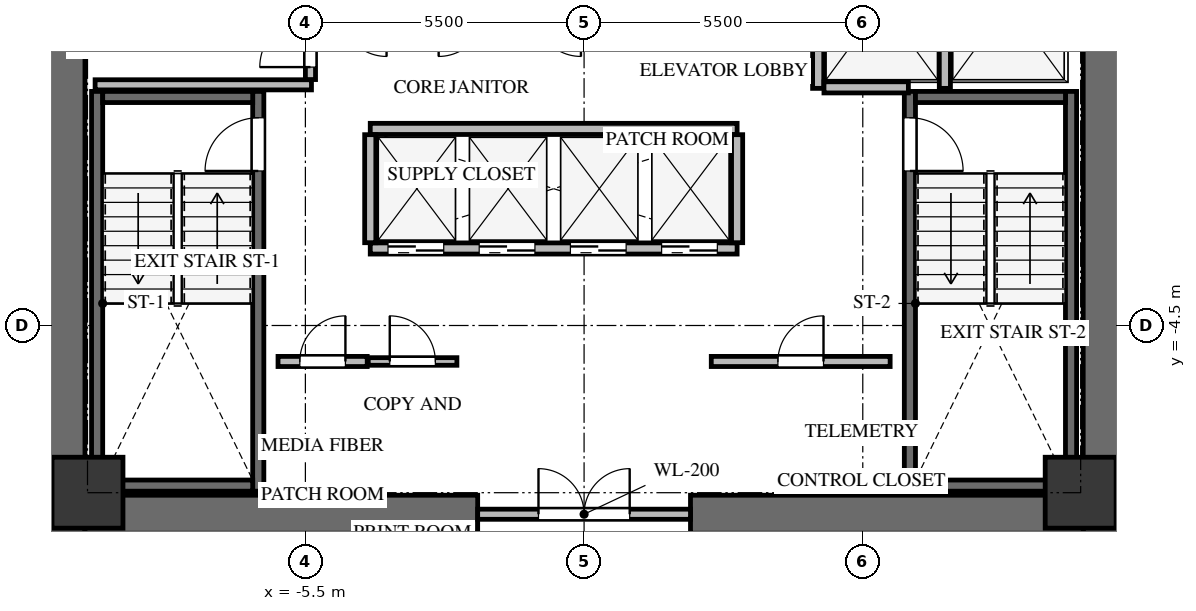
"""IFC4 building model, lengths in metres.
Left out: names, types, materials, properties, quantities, classifications, styles, units other than length and angle.
Written with IfcOpenShell. Run it as: python <this file> out.ifc"""

import sys

from ifc_helpers import new_model, si_unit, direction, frame, frame_2d, origin, origin_2d, place, context, subcontext, project, spatial, rectangle, extrude, source, transform, mapped, element, fill, save


model = new_model("IFC4")
c1 = context("Model", 3, precision=1e-05, world=origin(), true_north=direction((0.0, 1.0)))
c2 = subcontext(c1, "Body", "Model", "MODEL_VIEW")
j1 = project(units=[si_unit("LENGTHUNIT", "METRE"), si_unit("PLANEANGLEUNIT", "RADIAN")], contexts=[c1])
p1 = place(None, origin())
s1 = spatial("IfcSite", under=j1, at=p1, CompositionType="ELEMENT")
p2 = place(p1, origin())
s2 = spatial("IfcBuilding", under=s1, at=p2, CompositionType="ELEMENT")
p3 = place(p2, frame((0.0, 0.0, 107.4)))
s3 = spatial("IfcBuildingStorey", under=s2, at=p3, CompositionType="ELEMENT", Elevation=107.4)
for number, where, z_axis, x_axis in (
    (1, (-10.225, -8.6, 0.0), (0.0, 0.0, 1.0), (0.0, 1.0, 0.0)),
    (2, (10.225, -8.6, 0.0), (0.0, 0.0, 1.0), (0.0, 1.0, 0.0)),
):
    element("IfcWall", number, at=place(p3, frame(where, z_axis=z_axis, x_axis=x_axis)), inside=s3, PredefinedType="SHEAR", context=c2, shape_type="SweptSolid", body=[
        extrude(rectangle(XDim=17.2, YDim=0.75, at=frame_2d((8.6, 0.0))), origin(), (0.0, 0.0, 1.0), 3.3),
    ])
for number, where, z_axis, x_axis in (
    (3, (-9.85, -8.225, 0.0), (0.0, 0.0, 1.0), (1.0, 0.0, 0.0)),
    (4, (2.1, -8.225, 0.0), (0.0, 0.0, 1.0), (1.0, 0.0, 0.0)),
):
    element("IfcWall", number, at=place(p3, frame(where, z_axis=z_axis, x_axis=x_axis)), inside=s3, PredefinedType="SHEAR", context=c2, shape_type="SweptSolid", body=[
        extrude(rectangle(XDim=7.75, YDim=0.75, at=frame_2d((3.875, 0.0))), origin(), (0.0, 0.0, 1.0), 3.3),
    ])
p4 = place(p3, frame((-6.43, -7.77, -0.24), z_axis=(0.0, 0.0, 1.0), x_axis=(0.0, 1.0, 0.0)))
e5 = element("IfcWall", 5, at=p4, inside=s3, PredefinedType="SHEAR", context=c2, shape_type="SweptSolid", body=[
    extrude(rectangle(XDim=7.89, YDim=0.22, at=frame_2d((3.945, 0.0))), origin(), (0.0, 0.0, 1.0), 3.3),
])
p5 = place(p4, frame((6.32, 0.0, 0.0)))
e6 = element("IfcOpeningElement", 6, at=p5, cuts=e5, PredefinedType="OPENING", context=c2, shape_type="SweptSolid", body=[
    extrude(rectangle(XDim=1.05, YDim=2.15, at=frame_2d((0.525, 1.075))), frame((0.0, 0.12, 0.0), z_axis=(0.0, -1.0, 0.0), x_axis=(1.0, 0.0, 0.0)), (0.0, 0.0, 1.0), 0.24),
])
p6 = place(p3, frame((-9.61, 0.12, -0.24), z_axis=(0.0, 0.0, 1.0), x_axis=(0.0, -1.0, 0.0)))
e7 = element("IfcWall", 7, at=p6, inside=s3, PredefinedType="SHEAR", context=c2, shape_type="SweptSolid", body=[
    extrude(rectangle(XDim=7.89, YDim=0.22, at=frame_2d((3.945, 0.0))), origin(), (0.0, 0.0, 1.0), 3.3),
])
for number, where, z_axis, x_axis in (
    (8, (-9.5, -7.66, -0.24), (0.0, 0.0, 1.0), (1.0, 0.0, 0.0)),
    (9, (-6.54, 0.01, -0.24), (0.0, 0.0, 1.0), (-1.0, 0.0, 0.0)),
):
    element("IfcWall", number, at=place(p3, frame(where, z_axis=z_axis, x_axis=x_axis)), inside=s3, PredefinedType="SHEAR", context=c2, shape_type="SweptSolid", body=[
        extrude(rectangle(XDim=2.96, YDim=0.22, at=frame_2d((1.48, 0.0))), origin(), (0.0, 0.0, 1.0), 3.3),
    ])
p7 = place(p3, frame((9.61, -7.77, -0.24), z_axis=(0.0, 0.0, 1.0), x_axis=(0.0, 1.0, 0.0)))
e10 = element("IfcWall", 10, at=p7, inside=s3, PredefinedType="SHEAR", context=c2, shape_type="SweptSolid", body=[
    extrude(rectangle(XDim=7.89, YDim=0.22, at=frame_2d((3.945, 0.0))), origin(), (0.0, 0.0, 1.0), 3.3),
])
p8 = place(p3, frame((6.43, 0.12, -0.24), z_axis=(0.0, 0.0, 1.0), x_axis=(0.0, -1.0, 0.0)))
e11 = element("IfcWall", 11, at=p8, inside=s3, PredefinedType="SHEAR", context=c2, shape_type="SweptSolid", body=[
    extrude(rectangle(XDim=7.89, YDim=0.22, at=frame_2d((3.945, 0.0))), origin(), (0.0, 0.0, 1.0), 3.3),
])
p9 = place(p8, frame((0.52, 0.0, 0.0)))
e12 = element("IfcOpeningElement", 12, at=p9, cuts=e11, PredefinedType="OPENING", context=c2, shape_type="SweptSolid", body=[
    extrude(rectangle(XDim=1.05, YDim=2.15, at=frame_2d((0.525, 1.075))), frame((0.0, 0.12, 0.0), z_axis=(0.0, -1.0, 0.0), x_axis=(1.0, 0.0, 0.0)), (0.0, 0.0, 1.0), 0.24),
])
for number, where, z_axis, x_axis in (
    (13, (6.54, -7.66, -0.24), (0.0, 0.0, 1.0), (1.0, 0.0, 0.0)),
    (14, (9.5, 0.01, -0.24), (0.0, 0.0, 1.0), (-1.0, 0.0, 0.0)),
):
    element("IfcWall", number, at=place(p3, frame(where, z_axis=z_axis, x_axis=x_axis)), inside=s3, PredefinedType="SHEAR", context=c2, shape_type="SweptSolid", body=[
        extrude(rectangle(XDim=2.96, YDim=0.22, at=frame_2d((1.48, 0.0))), origin(), (0.0, 0.0, 1.0), 3.3),
    ])
m1 = source(origin(), c2, "Body", "SweptSolid", [
    extrude(rectangle(XDim=1.4, YDim=1.4, at=origin_2d()), origin(), (0.0, 0.0, 1.0), 3.3),
])
for number, where, z_axis, x_axis in (
    (15, (-9.8, -7.8, -0.24), (0.0, 0.0, 1.0), (1.0, 0.0, 0.0)),
    (16, (9.8, -7.8, -0.24), (0.0, 0.0, 1.0), (1.0, 0.0, 0.0)),
):
    element("IfcColumn", number, at=place(p3, frame(where, z_axis=z_axis, x_axis=x_axis)), inside=s3, PredefinedType="COLUMN", context=c2, shape_type="MappedRepresentation", body=[
        mapped(m1, transform((0.0, 0.0, 0.0), x_axis=(1.0, 0.0, 0.0), y_axis=(0.0, 1.0, 0.0), z_axis=(0.0, 0.0, 1.0), scale=1.0)),
    ])
p10 = place(p3, frame((-2.1, -8.225, 0.0), z_axis=(0.0, 0.0, 1.0), x_axis=(1.0, 0.0, 0.0)))
e17 = element("IfcWall", 17, at=p10, inside=s3, PredefinedType="SOLIDWALL", context=c2, shape_type="SweptSolid", body=[
    extrude(rectangle(XDim=4.2, YDim=0.2, at=frame_2d((2.1, 0.0))), origin(), (0.0, 0.0, 1.0), 3.045),
])
p11 = place(p10, frame((1.2, 0.0, 0.0)))
e18 = element("IfcOpeningElement", 18, at=p11, cuts=e17, PredefinedType="OPENING", context=c2, shape_type="SweptSolid", body=[
    extrude(rectangle(XDim=1.8, YDim=2.15, at=frame_2d((0.9, 1.075))), frame((0.0, 0.11, 0.0), z_axis=(0.0, -1.0, 0.0), x_axis=(1.0, 0.0, 0.0)), (0.0, 0.0, 1.0), 0.22),
])
p12 = place(p3, frame((-9.65, 0.25, 0.0), z_axis=(0.0, 0.0, 1.0), x_axis=(1.0, 0.0, 0.0)))
e19 = element("IfcWall", 19, at=p12, inside=s3, PredefinedType="SOLIDWALL", context=c2, shape_type="SweptSolid", body=[
    extrude(rectangle(XDim=4.27, YDim=0.2, at=frame_2d((2.135, 0.0))), origin(), (0.0, 0.0, 1.0), 3.045),
])
p13 = place(p3, frame((-5.4, 0.354, 0.0), z_axis=(0.0, 0.0, 1.0), x_axis=(0.0, 1.0, 0.0)))
e20 = element("IfcWall", 20, at=p13, inside=s3, PredefinedType="SOLIDWALL", context=c2, shape_type="SweptSolid", body=[
    extrude(rectangle(XDim=4.026, YDim=0.2, at=frame_2d((2.013, 0.0))), origin(), (0.0, 0.0, 1.0), 3.045),
])
p14 = place(p13, frame((0.246, 0.0, 0.0)))
e21 = element("IfcOpeningElement", 21, at=p14, cuts=e20, PredefinedType="OPENING", context=c2, shape_type="SweptSolid", body=[
    extrude(rectangle(XDim=1.0, YDim=2.15, at=frame_2d((0.5, 1.075))), frame((0.0, 0.11, 0.0), z_axis=(0.0, -1.0, 0.0), x_axis=(1.0, 0.0, 0.0)), (0.0, 0.0, 1.0), 0.22),
])
for number, where, z_axis, x_axis in (
    (22, (4.62, 0.18, 0.0), (0.0, 0.0, 1.0), (0.0, 1.0, 0.0)),
    (23, (7.12, 0.18, 0.0), (0.0, 0.0, 1.0), (0.0, 1.0, 0.0)),
):
    element("IfcWall", number, at=place(p3, frame(where, z_axis=z_axis, x_axis=x_axis)), inside=s3, PredefinedType="SOLIDWALL", context=c2, shape_type="SweptSolid", body=[
        extrude(rectangle(XDim=3.186, YDim=0.22, at=frame_2d((1.593, 0.0))), origin(), (0.0, 0.0, 1.0), 3.045),
    ])
p15 = place(p3, frame((4.734, 0.2, 0.0), z_axis=(0.0, 0.0, 1.0), x_axis=(1.0, 0.0, 0.0)))
e24 = element("IfcWall", 24, at=p15, inside=s3, PredefinedType="SOLIDWALL", context=c2, shape_type="SweptSolid", body=[
    extrude(rectangle(XDim=1.666, YDim=0.22, at=frame_2d((0.833, 0.0))), origin(), (0.0, 0.0, 1.0), 3.045),
])
p16 = place(p3, frame((-4.22, -2.98, 0.0), z_axis=(0.0, 0.0, 1.0), x_axis=(1.0, 0.0, 0.0)))
e25 = element("IfcWall", 25, at=p16, inside=s3, PredefinedType="SOLIDWALL", context=c2, shape_type="SweptSolid", body=[
    extrude(rectangle(XDim=7.24, YDim=0.22, at=frame_2d((3.62, 0.0))), origin(), (0.0, 0.0, 1.0), 3.045),
])
p17 = place(p16, frame((0.35, 0.0, 0.0)))
e26 = element("IfcOpeningElement", 26, at=p17, cuts=e25, PredefinedType="OPENING", context=c2, shape_type="SweptSolid", body=[
    extrude(rectangle(XDim=1.1, YDim=2.15, at=frame_2d((0.55, 1.075))), frame((0.0, 0.12, 0.0), z_axis=(0.0, -1.0, 0.0), x_axis=(1.0, 0.0, 0.0)), (0.0, 0.0, 1.0), 0.24),
])
p18 = place(p16, frame((2.15, 0.0, 0.0)))
e27 = element("IfcOpeningElement", 27, at=p18, cuts=e25, PredefinedType="OPENING", context=c2, shape_type="SweptSolid", body=[
    extrude(rectangle(XDim=1.1, YDim=2.15, at=frame_2d((0.55, 1.075))), frame((0.0, 0.12, 0.0), z_axis=(0.0, -1.0, 0.0), x_axis=(1.0, 0.0, 0.0)), (0.0, 0.0, 1.0), 0.24),
])
p19 = place(p16, frame((3.95, 0.0, 0.0)))
e28 = element("IfcOpeningElement", 28, at=p19, cuts=e25, PredefinedType="OPENING", context=c2, shape_type="SweptSolid", body=[
    extrude(rectangle(XDim=1.1, YDim=2.15, at=frame_2d((0.55, 1.075))), frame((0.0, 0.12, 0.0), z_axis=(0.0, -1.0, 0.0), x_axis=(1.0, 0.0, 0.0)), (0.0, 0.0, 1.0), 0.24),
])
p20 = place(p16, frame((5.75, 0.0, 0.0)))
e29 = element("IfcOpeningElement", 29, at=p20, cuts=e25, PredefinedType="OPENING", context=c2, shape_type="SweptSolid", body=[
    extrude(rectangle(XDim=1.1, YDim=2.15, at=frame_2d((0.55, 1.075))), frame((0.0, 0.12, 0.0), z_axis=(0.0, -1.0, 0.0), x_axis=(1.0, 0.0, 0.0)), (0.0, 0.0, 1.0), 0.24),
])
p21 = place(p3, frame((-4.22, -0.62, 0.0), z_axis=(0.0, 0.0, 1.0), x_axis=(1.0, 0.0, 0.0)))
e30 = element("IfcWall", 30, at=p21, inside=s3, PredefinedType="SOLIDWALL", context=c2, shape_type="SweptSolid", body=[
    extrude(rectangle(XDim=7.24, YDim=0.22, at=frame_2d((3.62, 0.0))), origin(), (0.0, 0.0, 1.0), 3.045),
])
for number, where, z_axis, x_axis in (
    (31, (-4.22, -2.866, 0.0), (0.0, 0.0, 1.0), (0.0, 1.0, 0.0)),
    (32, (3.02, -2.866, 0.0), (0.0, 0.0, 1.0), (0.0, 1.0, 0.0)),
):
    element("IfcWall", number, at=place(p3, frame(where, z_axis=z_axis, x_axis=x_axis)), inside=s3, PredefinedType="SOLIDWALL", context=c2, shape_type="SweptSolid", body=[
        extrude(rectangle(XDim=2.132, YDim=0.22, at=frame_2d((1.066, 0.0))), origin(), (0.0, 0.0, 1.0), 3.045),
    ])
p22 = place(p3, frame((-6.04, -5.21, 0.0), z_axis=(0.0, 0.0, 1.0), x_axis=(1.0, 0.0, 0.0)))
e33 = element("IfcWall", 33, at=p22, inside=s3, PredefinedType="SOLIDWALL", context=c2, shape_type="SweptSolid", body=[
    extrude(rectangle(XDim=1.76, YDim=0.2, at=frame_2d((0.88, 0.0))), origin(), (0.0, 0.0, 1.0), 3.045),
])
p23 = place(p22, frame((0.43, 0.0, 0.0)))
e34 = element("IfcOpeningElement", 34, at=p23, cuts=e33, PredefinedType="OPENING", context=c2, shape_type="SweptSolid", body=[
    extrude(rectangle(XDim=0.9, YDim=2.05, at=frame_2d((0.45, 1.025))), frame((0.0, 0.11, 0.0), z_axis=(0.0, -1.0, 0.0), x_axis=(1.0, 0.0, 0.0)), (0.0, 0.0, 1.0), 0.22),
])
p24 = place(p3, frame((-4.26, -5.21, 0.0), z_axis=(0.0, 0.0, 1.0), x_axis=(1.0, 0.0, 0.0)))
e35 = element("IfcWall", 35, at=p24, inside=s3, PredefinedType="PARTITIONING", context=c2, shape_type="SweptSolid", body=[
    extrude(rectangle(XDim=1.75, YDim=0.15, at=frame_2d((0.875, 0.0))), origin(), (0.0, 0.0, 1.0), 3.045),
])
p25 = place(p24, frame((0.425, 0.0, 0.0)))
e36 = element("IfcOpeningElement", 36, at=p25, cuts=e35, PredefinedType="OPENING", context=c2, shape_type="SweptSolid", body=[
    extrude(rectangle(XDim=0.9, YDim=2.05, at=frame_2d((0.45, 1.025))), frame((0.0, 0.085, 0.0), z_axis=(0.0, -1.0, 0.0), x_axis=(1.0, 0.0, 0.0)), (0.0, 0.0, 1.0), 0.17),
])
p26 = place(p3, frame((2.51, -5.21, 0.0), z_axis=(0.0, 0.0, 1.0), x_axis=(1.0, 0.0, 0.0)))
e37 = element("IfcWall", 37, at=p26, inside=s3, PredefinedType="SOLIDWALL", context=c2, shape_type="SweptSolid", body=[
    extrude(rectangle(XDim=3.53, YDim=0.2, at=frame_2d((1.765, 0.0))), origin(), (0.0, 0.0, 1.0), 3.045),
])
p27 = place(p26, frame((1.315, 0.0, 0.0)))
e38 = element("IfcOpeningElement", 38, at=p27, cuts=e37, PredefinedType="OPENING", context=c2, shape_type="SweptSolid", body=[
    extrude(rectangle(XDim=0.9, YDim=2.05, at=frame_2d((0.45, 1.025))), frame((0.0, 0.11, 0.0), z_axis=(0.0, -1.0, 0.0), x_axis=(1.0, 0.0, 0.0)), (0.0, 0.0, 1.0), 0.22),
])
m2 = source(origin(), c2, "Body", "SweptSolid", [
    extrude(rectangle(XDim=1.05, YDim=2.15, at=frame_2d((0.525, 1.075))), frame((0.0, 0.025, 0.0), z_axis=(0.0, -1.0, 0.0), x_axis=(1.0, 0.0, 0.0)), (0.0, 0.0, 1.0), 0.05),
])
p28 = place(p5, origin())
e39 = element("IfcDoor", 39, at=p28, inside=s3, OperationType="SINGLE_SWING_LEFT", PredefinedType="DOOR", context=c2, shape_type="MappedRepresentation", body=[
    mapped(m2, transform((0.0, 0.0, 0.0), x_axis=(1.0, 0.0, 0.0), y_axis=(0.0, 1.0, 0.0), z_axis=(0.0, 0.0, 1.0), scale=1.0)),
])
fill(e6, e39)
m3 = source(origin(), c2, "Body", "SweptSolid", [
    extrude(rectangle(XDim=1.05, YDim=2.15, at=frame_2d((0.525, 1.075))), frame((0.0, 0.025, 0.0), z_axis=(0.0, -1.0, 0.0), x_axis=(1.0, 0.0, 0.0)), (0.0, 0.0, 1.0), 0.05),
])
p29 = place(p9, origin())
e40 = element("IfcDoor", 40, at=p29, inside=s3, OperationType="SINGLE_SWING_RIGHT", PredefinedType="DOOR", context=c2, shape_type="MappedRepresentation", body=[
    mapped(m3, transform((0.0, 0.0, 0.0), x_axis=(1.0, 0.0, 0.0), y_axis=(0.0, 1.0, 0.0), z_axis=(0.0, 0.0, 1.0), scale=1.0)),
])
fill(e12, e40)
m4 = source(origin(), c2, "Body", "SweptSolid", [
    extrude(rectangle(XDim=1.8, YDim=2.15, at=frame_2d((0.9, 1.075))), frame((0.0, 0.025, 0.0), z_axis=(0.0, -1.0, 0.0), x_axis=(1.0, 0.0, 0.0)), (0.0, 0.0, 1.0), 0.05),
])
p30 = place(p11, origin())
e41 = element("IfcDoor", 41, at=p30, inside=s3, OperationType="DOUBLE_DOOR_SINGLE_SWING", PredefinedType="DOOR", context=c2, shape_type="MappedRepresentation", body=[
    mapped(m4, transform((0.0, 0.0, 0.0), x_axis=(1.0, 0.0, 0.0), y_axis=(0.0, 1.0, 0.0), z_axis=(0.0, 0.0, 1.0), scale=1.0)),
])
fill(e18, e41)
m5 = source(origin(), c2, "Body", "SweptSolid", [
    extrude(rectangle(XDim=1.0, YDim=2.15, at=frame_2d((0.5, 1.075))), frame((0.0, 0.025, 0.0), z_axis=(0.0, -1.0, 0.0), x_axis=(1.0, 0.0, 0.0)), (0.0, 0.0, 1.0), 0.05),
])
p31 = place(p14, origin())
e42 = element("IfcDoor", 42, at=p31, inside=s3, OperationType="SINGLE_SWING_LEFT", PredefinedType="DOOR", context=c2, shape_type="MappedRepresentation", body=[
    mapped(m5, transform((0.0, 0.0, 0.0), x_axis=(1.0, 0.0, 0.0), y_axis=(0.0, 1.0, 0.0), z_axis=(0.0, 0.0, 1.0), scale=1.0)),
])
fill(e21, e42)
m6 = source(origin(), c2, "Body", "SweptSolid", [
    extrude(rectangle(XDim=1.1, YDim=2.15, at=frame_2d((0.55, 1.075))), frame((0.0, 0.025, 0.0), z_axis=(0.0, -1.0, 0.0), x_axis=(1.0, 0.0, 0.0)), (0.0, 0.0, 1.0), 0.05),
])
p32 = place(p17, origin())
e43 = element("IfcDoor", 43, at=p32, inside=s3, OperationType="DOUBLE_DOOR_SLIDING", PredefinedType="DOOR", context=c2, shape_type="MappedRepresentation", body=[
    mapped(m6, transform((0.0, 0.0, 0.0), x_axis=(1.0, 0.0, 0.0), y_axis=(0.0, 1.0, 0.0), z_axis=(0.0, 0.0, 1.0), scale=1.0)),
])
fill(e26, e43)
p33 = place(p18, origin())
e44 = element("IfcDoor", 44, at=p33, inside=s3, OperationType="DOUBLE_DOOR_SLIDING", PredefinedType="DOOR", context=c2, shape_type="MappedRepresentation", body=[
    mapped(m6, transform((0.0, 0.0, 0.0), x_axis=(1.0, 0.0, 0.0), y_axis=(0.0, 1.0, 0.0), z_axis=(0.0, 0.0, 1.0), scale=1.0)),
])
fill(e27, e44)
p34 = place(p19, origin())
e45 = element("IfcDoor", 45, at=p34, inside=s3, OperationType="DOUBLE_DOOR_SLIDING", PredefinedType="DOOR", context=c2, shape_type="MappedRepresentation", body=[
    mapped(m6, transform((0.0, 0.0, 0.0), x_axis=(1.0, 0.0, 0.0), y_axis=(0.0, 1.0, 0.0), z_axis=(0.0, 0.0, 1.0), scale=1.0)),
])
fill(e28, e45)
p35 = place(p20, origin())
e46 = element("IfcDoor", 46, at=p35, inside=s3, OperationType="DOUBLE_DOOR_SLIDING", PredefinedType="DOOR", context=c2, shape_type="MappedRepresentation", body=[
    mapped(m6, transform((0.0, 0.0, 0.0), x_axis=(1.0, 0.0, 0.0), y_axis=(0.0, 1.0, 0.0), z_axis=(0.0, 0.0, 1.0), scale=1.0)),
])
fill(e29, e46)
m7 = source(origin(), c2, "Body", "SweptSolid", [
    extrude(rectangle(XDim=0.9, YDim=2.05, at=frame_2d((0.45, 1.025))), frame((0.0, 0.025, 0.0), z_axis=(0.0, -1.0, 0.0), x_axis=(1.0, 0.0, 0.0)), (0.0, 0.0, 1.0), 0.05),
])
p36 = place(p23, origin())
e47 = element("IfcDoor", 47, at=p36, inside=s3, OperationType="SINGLE_SWING_RIGHT", PredefinedType="DOOR", context=c2, shape_type="MappedRepresentation", body=[
    mapped(m7, transform((0.0, 0.0, 0.0), x_axis=(1.0, 0.0, 0.0), y_axis=(0.0, 1.0, 0.0), z_axis=(0.0, 0.0, 1.0), scale=1.0)),
])
fill(e34, e47)
m8 = source(origin(), c2, "Body", "SweptSolid", [
    extrude(rectangle(XDim=0.9, YDim=2.05, at=frame_2d((0.45, 1.025))), frame((0.0, 0.025, 0.0), z_axis=(0.0, -1.0, 0.0), x_axis=(1.0, 0.0, 0.0)), (0.0, 0.0, 1.0), 0.05),
])
p37 = place(p25, origin())
e48 = element("IfcDoor", 48, at=p37, inside=s3, OperationType="SINGLE_SWING_LEFT", PredefinedType="DOOR", context=c2, shape_type="MappedRepresentation", body=[
    mapped(m8, transform((0.0, 0.0, 0.0), x_axis=(1.0, 0.0, 0.0), y_axis=(0.0, 1.0, 0.0), z_axis=(0.0, 0.0, 1.0), scale=1.0)),
])
fill(e36, e48)
p38 = place(p27, origin())
e49 = element("IfcDoor", 49, at=p38, inside=s3, OperationType="SINGLE_SWING_RIGHT", PredefinedType="DOOR", context=c2, shape_type="MappedRepresentation", body=[
    mapped(m7, transform((0.0, 0.0, 0.0), x_axis=(1.0, 0.0, 0.0), y_axis=(0.0, 1.0, 0.0), z_axis=(0.0, 0.0, 1.0), scale=1.0)),
])
fill(e38, e49)
save(model, sys.argv[1])
